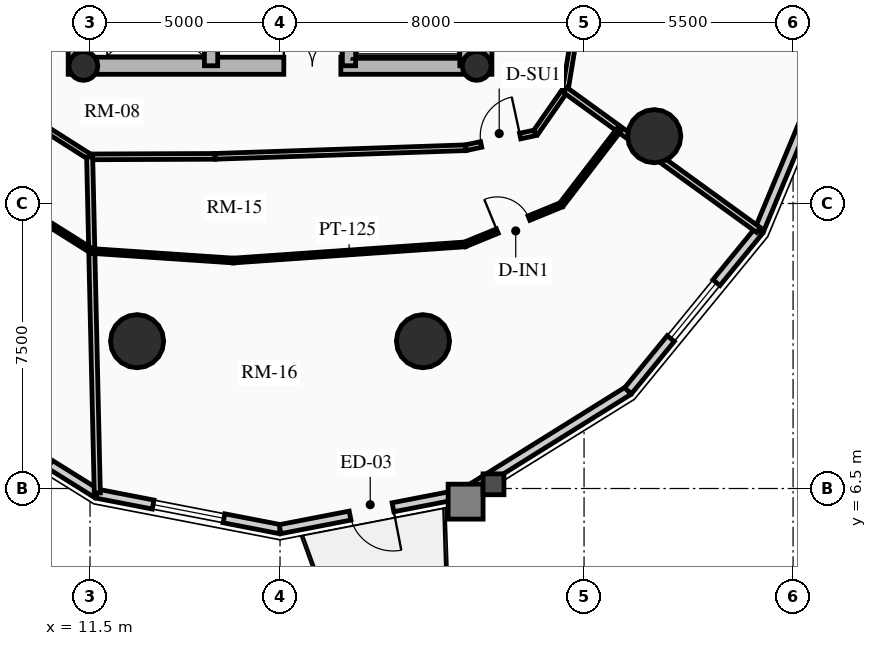
"""IFC4 building model, lengths in metres.
Left out: names, types, materials, properties, quantities, classifications, styles, units other than length and angle.
Written with IfcOpenShell. Run it as: python <this file> out.ifc"""

import sys

from ifc_helpers import new_model, si_unit, direction, frame, frame_2d, origin, origin_2d, place, context, subcontext, project, spatial, rectangle, circle, hollow_circle, extrude, source, transform, mapped, element, fill, save


model = new_model("IFC4")
c1 = context("Model", 3, precision=1e-05, world=origin(), true_north=direction((0.0, 1.0)))
c2 = subcontext(c1, "Body", "Model", "MODEL_VIEW")
j1 = project(units=[si_unit("LENGTHUNIT", "METRE"), si_unit("PLANEANGLEUNIT", "RADIAN")], contexts=[c1])
p1 = place(None, origin())
s1 = spatial("IfcSite", under=j1, at=p1, CompositionType="ELEMENT")
p2 = place(p1, origin())
s2 = spatial("IfcBuilding", under=s1, at=p2, CompositionType="ELEMENT")
p3 = place(p2, frame((0.0, 0.0, 93.43)))
s3 = spatial("IfcBuildingStorey", under=s2, at=p3, CompositionType="ELEMENT", Elevation=93.43)
for number, where, z_axis, x_axis in (
    (1, (11.15, 17.4, 0.0), (0.0, 0.0, 1.0), (0.0, 1.0, 0.0)),
    (2, (21.85, 17.4, 0.0), (0.0, 0.0, 1.0), (0.0, 1.0, 0.0)),
):
    element("IfcWall", number, at=place(p3, frame(where, z_axis=z_axis, x_axis=x_axis)), inside=s3, PredefinedType="SHEAR", context=c2, shape_type="SweptSolid", body=[
        extrude(rectangle(XDim=14.2, YDim=0.45, at=frame_2d((7.1, 0.0))), origin(), (0.0, 0.0, 1.0), 2.91),
    ])
p4 = place(p3, frame((11.15, 17.625, 0.0), z_axis=(0.0, 0.0, 1.0), x_axis=(1.0, 0.0, 0.0)))
e3 = element("IfcWall", 3, at=p4, inside=s3, PredefinedType="SHEAR", context=c2, shape_type="SweptSolid", body=[
    extrude(rectangle(XDim=10.7, YDim=0.45, at=frame_2d((5.35, 0.0))), origin(), (0.0, 0.0, 1.0), 2.91),
])
m1 = source(origin(), c2, "Body", "SweptSolid", [
    extrude(rectangle(XDim=1.5, YDim=2.02, at=frame_2d((0.75, 1.01))), frame((0.0, 0.235, 0.0), z_axis=(0.0, -1.0, 0.0), x_axis=(1.0, 0.0, 0.0)), (0.0, 0.0, 1.0), 0.47),
])
p5 = place(p4, frame((5.45, 0.0, 0.0)))
e4 = element("IfcOpeningElement", 4, at=p5, cuts=e3, PredefinedType="OPENING", context=c2, shape_type="MappedRepresentation", body=[
    mapped(m1, transform((0.0, 0.0, 0.0), x_axis=(1.0, 0.0, 0.0), y_axis=(0.0, 1.0, 0.0), z_axis=(0.0, 0.0, 1.0), scale=1.0)),
])
p6 = place(p3, frame((14.685, 17.625, 0.0), z_axis=(0.0, 0.0, 1.0), x_axis=(0.0, 1.0, 0.0)))
e5 = element("IfcWall", 5, at=p6, inside=s3, PredefinedType="SHEAR", context=c2, shape_type="SweptSolid", body=[
    extrude(rectangle(XDim=13.75, YDim=0.35, at=frame_2d((6.875, 0.0))), origin(), (0.0, 0.0, 1.0), 2.91),
])
m2 = source(origin(), c2, "Body", "SweptSolid", [
    extrude(rectangle(XDim=1.1, YDim=2.015, at=frame_2d((0.55, 1.007))), frame((0.0, 0.185, 0.0), z_axis=(0.0, -1.0, 0.0), x_axis=(1.0, 0.0, 0.0)), (0.0, 0.0, 1.0), 0.37),
])
p7 = place(p6, frame((4.875, 0.0, 0.0)))
e6 = element("IfcOpeningElement", 6, at=p7, cuts=e5, PredefinedType="OPENING", context=c2, shape_type="MappedRepresentation", body=[
    mapped(m2, transform((0.0, 0.0, 0.0), x_axis=(1.0, 0.0, 0.0), y_axis=(0.0, 1.0, 0.0), z_axis=(0.0, 0.0, 1.0), scale=1.0)),
])
m3 = source(origin(), c2, "Body", "SweptSolid", [
    extrude(rectangle(XDim=1.15, YDim=2.02, at=frame_2d((0.575, 1.01))), frame((0.0, 0.185, 0.0), z_axis=(0.0, -1.0, 0.0), x_axis=(1.0, 0.0, 0.0)), (0.0, 0.0, 1.0), 0.37),
])
p8 = place(p6, frame((7.295, 0.0, 0.0)))
e7 = element("IfcOpeningElement", 7, at=p8, cuts=e5, PredefinedType="OPENING", context=c2, shape_type="MappedRepresentation", body=[
    mapped(m3, transform((0.0, 0.0, 0.0), x_axis=(1.0, 0.0, 0.0), y_axis=(0.0, 1.0, 0.0), z_axis=(0.0, 0.0, 1.0), scale=1.0)),
])
p9 = place(p3, frame((18.315, 17.625, 0.0), z_axis=(0.0, 0.0, 1.0), x_axis=(0.0, 1.0, 0.0)))
e8 = element("IfcWall", 8, at=p9, inside=s3, PredefinedType="SHEAR", context=c2, shape_type="SweptSolid", body=[
    extrude(rectangle(XDim=13.75, YDim=0.35, at=frame_2d((6.875, 0.0))), origin(), (0.0, 0.0, 1.0), 2.91),
])
p10 = place(p9, frame((10.0, 0.0, 0.0)))
e9 = element("IfcOpeningElement", 9, at=p10, cuts=e8, PredefinedType="OPENING", context=c2, shape_type="MappedRepresentation", body=[
    mapped(m2, transform((0.0, 0.0, 0.0), x_axis=(1.0, 0.0, 0.0), y_axis=(0.0, 1.0, 0.0), z_axis=(0.0, 0.0, 1.0), scale=1.0)),
])
p11 = place(p9, frame((12.0, 0.0, 0.0)))
e10 = element("IfcOpeningElement", 10, at=p11, cuts=e8, PredefinedType="OPENING", context=c2, shape_type="MappedRepresentation", body=[
    mapped(m2, transform((0.0, 0.0, 0.0), x_axis=(1.0, 0.0, 0.0), y_axis=(0.0, 1.0, 0.0), z_axis=(0.0, 0.0, 1.0), scale=1.0)),
])
p12 = place(p9, frame((5.305, 0.0, 0.0)))
e11 = element("IfcOpeningElement", 11, at=p12, cuts=e8, PredefinedType="OPENING", context=c2, shape_type="MappedRepresentation", body=[
    mapped(m3, transform((0.0, 0.0, 0.0), x_axis=(1.0, 0.0, 0.0), y_axis=(0.0, 1.0, 0.0), z_axis=(0.0, 0.0, 1.0), scale=1.0)),
])
p13 = place(p3, frame((21.405, 17.625, 0.0), z_axis=(0.0, 0.0, 1.0), x_axis=(0.0, 1.0, 0.0)))
e12 = element("IfcWall", 12, at=p13, inside=s3, PredefinedType="SHEAR", context=c2, shape_type="SweptSolid", body=[
    extrude(rectangle(XDim=6.72, YDim=0.35, at=frame_2d((3.36, 0.0))), origin(), (0.0, 0.0, 1.0), 2.91),
])
for number, where, z_axis, x_axis in (
    (13, (11.325, 17.62, 0.0), (0.0, 0.0, 1.0), (1.0, 0.0, 0.0)),
    (14, (21.675, 17.62, 0.0), (0.0, 0.0, 1.0), (1.0, 0.0, 0.0)),
):
    element("IfcColumn", number, at=place(p3, frame(where, z_axis=z_axis, x_axis=x_axis)), inside=s3, PredefinedType="COLUMN", context=c2, shape_type="SweptSolid", body=[
        extrude(hollow_circle(Radius=0.38, WallThickness=0.032, at=origin_2d()), origin(), (0.0, 0.0, 1.0), 2.91),
    ])
for number, where, z_axis, x_axis in (
    (15, (12.739, 10.377, 0.0), (0.0, 0.0, 1.0), (1.0, 0.0, 0.0)),
    (16, (20.261, 10.377, 0.0), (0.0, 0.0, 1.0), (1.0, 0.0, 0.0)),
    (17, (26.347, 15.771, 0.0), (0.0, 0.0, 1.0), (1.0, 0.0, 0.0)),
):
    element("IfcColumn", number, at=place(p3, frame(where, z_axis=z_axis, x_axis=x_axis)), inside=s3, PredefinedType="USERDEFINED", context=c2, shape_type="SweptSolid", body=[
        extrude(circle(Radius=0.7, at=origin_2d()), origin(), (0.0, 0.0, 1.0), 2.91),
    ])
p14 = place(p3, frame((11.685, 6.363, 0.0), z_axis=(0.0, 0.0, 1.0), x_axis=(-0.848520380187, 0.529162701263, 0.0)))
e18 = element("IfcWall", 18, at=p14, inside=s3, PredefinedType="SOLIDWALL", context=c2, shape_type="SweptSolid", body=[
    extrude(rectangle(XDim=5.119, YDim=0.24, at=frame_2d((2.56, 0.0))), origin(), (0.0, 0.0, 1.0), 2.179),
])
m4 = source(origin(), c2, "Body", "SweptSolid", [
    extrude(rectangle(XDim=2.2, YDim=1.35, at=frame_2d((1.1, 0.675))), frame((0.0, 0.13, 0.0), z_axis=(0.0, -1.0, 0.0), x_axis=(1.0, 0.0, 0.0)), (0.0, 0.0, 1.0), 0.26),
])
p15 = place(p14, frame((1.459, 0.0, 0.65)))
e19 = element("IfcOpeningElement", 19, at=p15, cuts=e18, PredefinedType="OPENING", context=c2, shape_type="MappedRepresentation", body=[
    mapped(m4, transform((0.0, 0.0, 0.0), x_axis=(1.0, 0.0, 0.0), y_axis=(0.0, 1.0, 0.0), z_axis=(0.0, 0.0, 1.0), scale=1.0)),
])
p16 = place(p3, frame((16.5, 5.43, 0.0), z_axis=(0.0, 0.0, 1.0), x_axis=(-0.981723785992, 0.190311344954, 0.0)))
e20 = element("IfcWall", 20, at=p16, inside=s3, PredefinedType="SOLIDWALL", context=c2, shape_type="SweptSolid", body=[
    extrude(rectangle(XDim=4.904, YDim=0.24, at=frame_2d((2.452, 0.0))), origin(), (0.0, 0.0, 1.0), 2.179),
])
m5 = source(origin(), c2, "Body", "SweptSolid", [
    extrude(rectangle(XDim=1.9, YDim=1.35, at=frame_2d((0.95, 0.675))), frame((0.0, 0.13, 0.0), z_axis=(0.0, -1.0, 0.0), x_axis=(1.0, 0.0, 0.0)), (0.0, 0.0, 1.0), 0.26),
])
p17 = place(p16, frame((1.502, 0.0, 0.65)))
e21 = element("IfcOpeningElement", 21, at=p17, cuts=e20, PredefinedType="OPENING", context=c2, shape_type="MappedRepresentation", body=[
    mapped(m5, transform((0.0, 0.0, 0.0), x_axis=(1.0, 0.0, 0.0), y_axis=(0.0, 1.0, 0.0), z_axis=(0.0, 0.0, 1.0), scale=1.0)),
])
p18 = place(p3, frame((21.315, 6.363, 0.0), z_axis=(0.0, 0.0, 1.0), x_axis=(-0.981723785992, -0.190311344954, 0.0)))
e22 = element("IfcWall", 22, at=p18, inside=s3, PredefinedType="SOLIDWALL", context=c2, shape_type="SweptSolid", body=[
    extrude(rectangle(XDim=4.904, YDim=0.24, at=frame_2d((2.452, 0.0))), origin(), (0.0, 0.0, 1.0), 2.179),
])
m6 = source(origin(), c2, "Body", "SweptSolid", [
    extrude(rectangle(XDim=1.15, YDim=2.005, at=frame_2d((0.575, 1.002))), frame((0.0, 0.13, 0.0), z_axis=(0.0, -1.0, 0.0), x_axis=(1.0, 0.0, 0.0)), (0.0, 0.0, 1.0), 0.26),
])
p19 = place(p18, frame((1.877, 0.0, 0.0)))
e23 = element("IfcOpeningElement", 23, at=p19, cuts=e22, PredefinedType="OPENING", context=c2, shape_type="MappedRepresentation", body=[
    mapped(m6, transform((0.0, 0.0, 0.0), x_axis=(1.0, 0.0, 0.0), y_axis=(0.0, 1.0, 0.0), z_axis=(0.0, 0.0, 1.0), scale=1.0)),
])
p20 = place(p3, frame((25.658, 9.072, 0.0), z_axis=(0.0, 0.0, 1.0), x_axis=(-0.848520380187, -0.529162701263, 0.0)))
e24 = element("IfcWall", 24, at=p20, inside=s3, PredefinedType="SOLIDWALL", context=c2, shape_type="SweptSolid", body=[
    extrude(rectangle(XDim=5.119, YDim=0.24, at=frame_2d((2.56, 0.0))), origin(), (0.0, 0.0, 1.0), 2.179),
])
p21 = place(p3, frame((29.105, 13.291, 0.0), z_axis=(0.0, 0.0, 1.0), x_axis=(-0.632700781152, -0.77439635945, 0.0)))
e25 = element("IfcWall", 25, at=p21, inside=s3, PredefinedType="SOLIDWALL", context=c2, shape_type="SweptSolid", body=[
    extrude(rectangle(XDim=5.448, YDim=0.24, at=frame_2d((2.724, 0.0))), origin(), (0.0, 0.0, 1.0), 2.179),
])
p22 = place(p21, frame((1.774, 0.0, 0.65)))
e26 = element("IfcOpeningElement", 26, at=p22, cuts=e25, PredefinedType="OPENING", context=c2, shape_type="MappedRepresentation", body=[
    mapped(m5, transform((0.0, 0.0, 0.0), x_axis=(1.0, 0.0, 0.0), y_axis=(0.0, 1.0, 0.0), z_axis=(0.0, 0.0, 1.0), scale=1.0)),
])
p23 = place(p3, frame((31.318, 18.607, 0.0), z_axis=(0.0, 0.0, 1.0), x_axis=(-0.384344417632, -0.923189779317, 0.0)))
e27 = element("IfcWall", 27, at=p23, inside=s3, PredefinedType="SOLIDWALL", context=c2, shape_type="SweptSolid", body=[
    extrude(rectangle(XDim=5.758, YDim=0.24, at=frame_2d((2.879, 0.0))), origin(), (0.0, 0.0, 1.0), 2.179),
])
p24 = place(p3, frame((10.156, 16.075, 0.0), z_axis=(0.0, 0.0, 1.0), x_axis=(0.843896624713, -0.536505812455, 0.0)))
e28 = element("IfcWall", 28, at=p24, inside=s3, PredefinedType="PARTITIONING", context=c2, shape_type="SweptSolid", body=[
    extrude(rectangle(XDim=1.581, YDim=0.15, at=frame_2d((0.791, 0.0))), origin(), (0.0, 0.0, 1.0), 2.225),
])
p25 = place(p3, frame((11.49, 15.227, 0.0), z_axis=(0.0, 0.0, 1.0), x_axis=(0.999991728046, 0.004067411998, 0.0)))
e29 = element("IfcWall", 29, at=p25, inside=s3, PredefinedType="PARTITIONING", context=c2, shape_type="SweptSolid", body=[
    extrude(rectangle(XDim=3.301, YDim=0.15, at=frame_2d((1.651, 0.0))), origin(), (0.0, 0.0, 1.0), 2.225),
])
p26 = place(p3, frame((14.792, 15.24, 0.0), z_axis=(0.0, 0.0, 1.0), x_axis=(0.999408106202, 0.034401122909, 0.0)))
e30 = element("IfcWall", 30, at=p26, inside=s3, PredefinedType="PARTITIONING", context=c2, shape_type="SweptSolid", body=[
    extrude(rectangle(XDim=6.6, YDim=0.15, at=frame_2d((3.3, 0.0))), origin(), (0.0, 0.0, 1.0), 2.225),
])
p27 = place(p3, frame((21.388, 15.468, 0.0), z_axis=(0.0, 0.0, 1.0), x_axis=(0.977672748596, 0.210133283069, 0.0)))
e31 = element("IfcWall", 31, at=p27, inside=s3, PredefinedType="PARTITIONING", context=c2, shape_type="SweptSolid", body=[
    extrude(rectangle(XDim=1.876, YDim=0.15, at=frame_2d((0.938, 0.0))), origin(), (0.0, 0.0, 1.0), 2.225),
])
m7 = source(origin(), c2, "Body", "SweptSolid", [
    extrude(rectangle(XDim=1.05, YDim=2.015, at=frame_2d((0.525, 1.007))), frame((0.0, 0.085, 0.0), z_axis=(0.0, -1.0, 0.0), x_axis=(1.0, 0.0, 0.0)), (0.0, 0.0, 1.0), 0.17),
])
p28 = place(p27, frame((0.413, 0.0, 0.0)))
e32 = element("IfcOpeningElement", 32, at=p28, cuts=e31, PredefinedType="OPENING", context=c2, shape_type="MappedRepresentation", body=[
    mapped(m7, transform((0.0, 0.0, 0.0), x_axis=(1.0, 0.0, 0.0), y_axis=(0.0, 1.0, 0.0), z_axis=(0.0, 0.0, 1.0), scale=1.0)),
])
p29 = place(p3, frame((23.222, 15.862, 0.0), z_axis=(0.0, 0.0, 1.0), x_axis=(0.571941738195, 0.820294244836, 0.0)))
e33 = element("IfcWall", 33, at=p29, inside=s3, PredefinedType="PARTITIONING", context=c2, shape_type="SweptSolid", body=[
    extrude(rectangle(XDim=1.369, YDim=0.15, at=frame_2d((0.685, 0.0))), origin(), (0.0, 0.0, 1.0), 2.225),
])
p30 = place(p3, frame((24.006, 16.985, 0.0), z_axis=(0.0, 0.0, 1.0), x_axis=(0.162043475877, 0.986783619608, 0.0)))
e34 = element("IfcWall", 34, at=p30, inside=s3, PredefinedType="PARTITIONING", context=c2, shape_type="SweptSolid", body=[
    extrude(rectangle(XDim=1.597, YDim=0.15, at=frame_2d((0.798, 0.0))), origin(), (0.0, 0.0, 1.0), 2.225),
])
p31 = place(p3, frame((11.49, 15.227, 0.0), z_axis=(0.0, 0.0, 1.0), x_axis=(0.022711375682, -0.999742063442, 0.0)))
e35 = element("IfcWall", 35, at=p31, inside=s3, PredefinedType="PARTITIONING", context=c2, shape_type="SweptSolid", body=[
    extrude(rectangle(XDim=8.847, YDim=0.16, at=frame_2d((4.423, 0.0))), origin(), (0.0, 0.0, 1.0), 2.179),
])
p32 = place(p3, frame((24.006, 16.985, 0.0), z_axis=(0.0, 0.0, 1.0), x_axis=(0.809849730791, -0.586637378231, 0.0)))
e36 = element("IfcWall", 36, at=p32, inside=s3, PredefinedType="PARTITIONING", context=c2, shape_type="SweptSolid", body=[
    extrude(rectangle(XDim=6.277, YDim=0.16, at=frame_2d((3.139, 0.0))), origin(), (0.0, 0.0, 1.0), 2.179),
])
p33 = place(p3, frame((9.371, 14.119, 0.0), z_axis=(0.0, 0.0, 1.0), x_axis=(0.846446940893, -0.532473075613, 0.0)))
e37 = element("IfcWall", 37, at=p33, inside=s3, PredefinedType="PARTITIONING", context=c2, shape_type="SweptSolid", body=[
    extrude(rectangle(XDim=2.57, YDim=0.125, at=frame_2d((1.285, 0.0))), origin(), (0.0, 0.0, 1.0), 2.225),
])
p34 = place(p3, frame((11.547, 12.75, 0.0), z_axis=(0.0, 0.0, 1.0), x_axis=(0.997731575096, -0.067317932645, 0.0)))
e38 = element("IfcWall", 38, at=p34, inside=s3, PredefinedType="PARTITIONING", context=c2, shape_type="SweptSolid", body=[
    extrude(rectangle(XDim=3.732, YDim=0.125, at=frame_2d((1.866, 0.0))), origin(), (0.0, 0.0, 1.0), 2.225),
])
p35 = place(p3, frame((15.27, 12.499, 0.0), z_axis=(0.0, 0.0, 1.0), x_axis=(0.997586055533, 0.069441067147, 0.0)))
e39 = element("IfcWall", 39, at=p35, inside=s3, PredefinedType="PARTITIONING", context=c2, shape_type="SweptSolid", body=[
    extrude(rectangle(XDim=6.11, YDim=0.125, at=frame_2d((3.055, 0.0))), origin(), (0.0, 0.0, 1.0), 2.225),
])
p36 = place(p3, frame((21.366, 12.924, 0.0), z_axis=(0.0, 0.0, 1.0), x_axis=(0.924996898971, 0.379974652962, 0.0)))
e40 = element("IfcWall", 40, at=p36, inside=s3, PredefinedType="PARTITIONING", context=c2, shape_type="SweptSolid", body=[
    extrude(rectangle(XDim=2.741, YDim=0.125, at=frame_2d((1.371, 0.0))), origin(), (0.0, 0.0, 1.0), 2.225),
])
m8 = source(origin(), c2, "Body", "SweptSolid", [
    extrude(rectangle(XDim=0.9, YDim=2.005, at=frame_2d((0.45, 1.002))), frame((0.0, 0.073, 0.0), z_axis=(0.0, -1.0, 0.0), x_axis=(1.0, 0.0, 0.0)), (0.0, 0.0, 1.0), 0.145),
])
p37 = place(p36, frame((0.92, 0.0, 0.0)))
e41 = element("IfcOpeningElement", 41, at=p37, cuts=e40, PredefinedType="OPENING", context=c2, shape_type="MappedRepresentation", body=[
    mapped(m8, transform((0.0, 0.0, 0.0), x_axis=(1.0, 0.0, 0.0), y_axis=(0.0, 1.0, 0.0), z_axis=(0.0, 0.0, 1.0), scale=1.0)),
])
p38 = place(p3, frame((23.901, 13.965, 0.0), z_axis=(0.0, 0.0, 1.0), x_axis=(0.609164923344, 0.793043565113, 0.0)))
e42 = element("IfcWall", 42, at=p38, inside=s3, PredefinedType="PARTITIONING", context=c2, shape_type="SweptSolid", body=[
    extrude(rectangle(XDim=2.508, YDim=0.125, at=frame_2d((1.254, 0.0))), origin(), (0.0, 0.0, 1.0), 2.655),
])
m9 = source(origin(), c2, "Body", "SweptSolid", [
    extrude(rectangle(XDim=1.9, YDim=1.35, at=frame_2d((0.95, 0.675))), frame((0.0, 0.03, 0.0), z_axis=(0.0, -1.0, 0.0), x_axis=(1.0, 0.0, 0.0)), (0.0, 0.0, 1.0), 0.06),
])
p39 = place(p17, origin())
e43 = element("IfcWindow", 43, at=p39, inside=s3, PartitioningType="DOUBLE_PANEL_VERTICAL", PredefinedType="WINDOW", context=c2, shape_type="MappedRepresentation", body=[
    mapped(m9, transform((0.0, 0.0, 0.0), x_axis=(1.0, 0.0, 0.0), y_axis=(0.0, 1.0, 0.0), z_axis=(0.0, 0.0, 1.0), scale=1.0)),
])
fill(e21, e43)
m10 = source(origin(), c2, "Body", "SweptSolid", [
    extrude(rectangle(XDim=1.15, YDim=2.005, at=frame_2d((0.575, 1.002))), frame((0.0, 0.025, 0.0), z_axis=(0.0, -1.0, 0.0), x_axis=(1.0, 0.0, 0.0)), (0.0, 0.0, 1.0), 0.05),
])
p40 = place(p19, origin())
e44 = element("IfcDoor", 44, at=p40, inside=s3, OperationType="SINGLE_SWING_LEFT", PredefinedType="DOOR", context=c2, shape_type="MappedRepresentation", body=[
    mapped(m10, transform((0.0, 0.0, 0.0), x_axis=(1.0, 0.0, 0.0), y_axis=(0.0, 1.0, 0.0), z_axis=(0.0, 0.0, 1.0), scale=1.0)),
])
fill(e23, e44)
p41 = place(p22, origin())
e45 = element("IfcWindow", 45, at=p41, inside=s3, PartitioningType="DOUBLE_PANEL_VERTICAL", PredefinedType="WINDOW", context=c2, shape_type="MappedRepresentation", body=[
    mapped(m9, transform((0.0, 0.0, 0.0), x_axis=(1.0, 0.0, 0.0), y_axis=(0.0, 1.0, 0.0), z_axis=(0.0, 0.0, 1.0), scale=1.0)),
])
fill(e26, e45)
m11 = source(origin(), c2, "Body", "SweptSolid", [
    extrude(rectangle(XDim=1.5, YDim=2.02, at=frame_2d((0.75, 1.01))), frame((0.0, 0.025, 0.0), z_axis=(0.0, -1.0, 0.0), x_axis=(1.0, 0.0, 0.0)), (0.0, 0.0, 1.0), 0.05),
])
p42 = place(p5, origin())
e46 = element("IfcDoor", 46, at=p42, inside=s3, OperationType="DOUBLE_DOOR_SINGLE_SWING", PredefinedType="DOOR", context=c2, shape_type="MappedRepresentation", body=[
    mapped(m11, transform((0.0, 0.0, 0.0), x_axis=(1.0, 0.0, 0.0), y_axis=(0.0, 1.0, 0.0), z_axis=(0.0, 0.0, 1.0), scale=1.0)),
])
fill(e4, e46)
m12 = source(origin(), c2, "Body", "SweptSolid", [
    extrude(rectangle(XDim=1.05, YDim=2.015, at=frame_2d((0.525, 1.007))), frame((0.0, 0.025, 0.0), z_axis=(0.0, -1.0, 0.0), x_axis=(1.0, 0.0, 0.0)), (0.0, 0.0, 1.0), 0.05),
])
p43 = place(p28, origin())
e47 = element("IfcDoor", 47, at=p43, inside=s3, OperationType="SINGLE_SWING_RIGHT", PredefinedType="DOOR", context=c2, shape_type="MappedRepresentation", body=[
    mapped(m12, transform((0.0, 0.0, 0.0), x_axis=(1.0, 0.0, 0.0), y_axis=(0.0, 1.0, 0.0), z_axis=(0.0, 0.0, 1.0), scale=1.0)),
])
fill(e32, e47)
m13 = source(origin(), c2, "Body", "SweptSolid", [
    extrude(rectangle(XDim=0.9, YDim=2.005, at=frame_2d((0.45, 1.002))), frame((0.0, 0.025, 0.0), z_axis=(0.0, -1.0, 0.0), x_axis=(1.0, 0.0, 0.0)), (0.0, 0.0, 1.0), 0.05),
])
p44 = place(p37, origin())
e48 = element("IfcDoor", 48, at=p44, inside=s3, OperationType="SINGLE_SWING_LEFT", PredefinedType="DOOR", context=c2, shape_type="MappedRepresentation", body=[
    mapped(m13, transform((0.0, 0.0, 0.0), x_axis=(1.0, 0.0, 0.0), y_axis=(0.0, 1.0, 0.0), z_axis=(0.0, 0.0, 1.0), scale=1.0)),
])
fill(e41, e48)
save(model, sys.argv[1])
